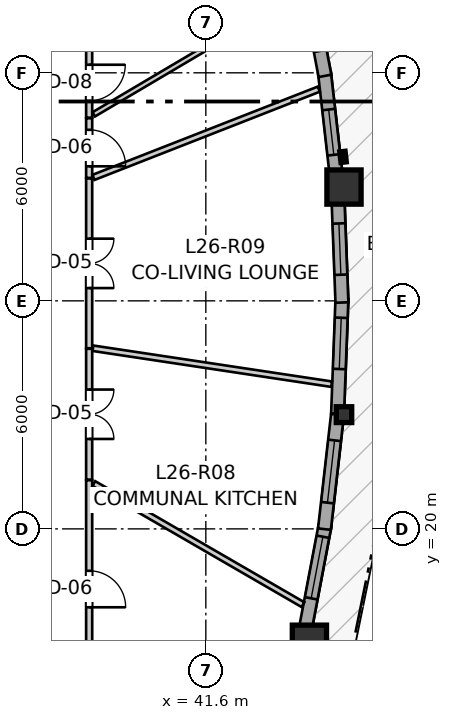
"""IFC4 building model, lengths in metres.
Left out: names, types, materials, properties, quantities, classifications, styles, units other than length and angle.
Written with IfcOpenShell. Run it as: python <this file> out.ifc"""

import sys

from ifc_helpers import new_model, si_unit, direction, frame, frame_2d, origin, origin_2d, place, context, subcontext, project, spatial, rectangle, i_section, extrude, source, transform, mapped, element, fill, save


model = new_model("IFC4")
c1 = context("Model", 3, precision=1e-05, world=origin(), true_north=direction((0.0, 1.0)))
c2 = subcontext(c1, "Body", "Model", "MODEL_VIEW")
j1 = project(units=[si_unit("LENGTHUNIT", "METRE"), si_unit("PLANEANGLEUNIT", "RADIAN")], contexts=[c1])
p1 = place(None, origin())
s1 = spatial("IfcSite", under=j1, at=p1, CompositionType="ELEMENT")
p2 = place(p1, origin())
s2 = spatial("IfcBuilding", under=s1, at=p2, CompositionType="ELEMENT")
p3 = place(p2, frame((0.0, 0.0, 89.6)))
s3 = spatial("IfcBuildingStorey", under=s2, at=p3, CompositionType="ELEMENT", Elevation=89.6)
m1 = source(origin(), c2, "Body", "SweptSolid", [
    extrude(rectangle(XDim=0.9, YDim=0.9, at=origin_2d()), origin(), (0.0, 0.0, 1.0), 2.95),
])
p4 = place(p3, frame((44.325, 17.017, 0.0), z_axis=(0.0, 0.0, 1.0), x_axis=(1.0, 0.0, 0.0)))
e1 = element("IfcColumn", 1, at=p4, inside=s3, PredefinedType="COLUMN", context=c2, shape_type="MappedRepresentation", body=[
    mapped(m1, transform((0.0, 0.0, 0.0), x_axis=(1.0, 0.0, 0.0), y_axis=(0.0, 1.0, 0.0), z_axis=(0.0, 0.0, 1.0), scale=1.0)),
])
m2 = source(origin(), c2, "Body", "SweptSolid", [
    extrude(i_section(OverallWidth=0.406, OverallDepth=0.416, WebThickness=0.027, FlangeThickness=0.044, FilletRadius=0.015, at=origin_2d()), origin(), (0.0, 0.0, 1.0), 2.95),
])
p5 = place(p3, frame((45.236, 23.006, 0.0), z_axis=(0.0, 0.0, 1.0), x_axis=(1.0, 0.0, 0.0)))
e2 = element("IfcColumn", 2, at=p5, inside=s3, PredefinedType="PILASTER", context=c2, shape_type="MappedRepresentation", body=[
    mapped(m2, transform((0.0, 0.0, 0.0), x_axis=(1.0, 0.0, 0.0), y_axis=(0.0, 1.0, 0.0), z_axis=(0.0, 0.0, 1.0), scale=1.0)),
])
p6 = place(p3, frame((45.236, 28.994, 0.0), z_axis=(0.0, 0.0, 1.0), x_axis=(1.0, 0.0, 0.0)))
e3 = element("IfcColumn", 3, at=p6, inside=s3, PredefinedType="COLUMN", context=c2, shape_type="MappedRepresentation", body=[
    mapped(m1, transform((0.0, 0.0, 0.0), x_axis=(1.0, 0.0, 0.0), y_axis=(0.0, 1.0, 0.0), z_axis=(0.0, 0.0, 1.0), scale=1.0)),
])
p7 = place(p3, frame((44.201, 17.275, 0.0), z_axis=(0.0, 0.0, 1.0), x_axis=(0.186703550023, 0.982416298933, 0.0)))
e4 = element("IfcWall", 4, at=p7, inside=s3, PredefinedType="SOLIDWALL", context=c2, shape_type="SweptSolid", body=[
    extrude(rectangle(XDim=2.856, YDim=0.34, at=frame_2d((1.428, 0.0))), origin(), (0.0, 0.0, 1.0), 2.48),
])
p8 = place(p7, frame((0.914, 0.0, 0.82)))
e5 = element("IfcOpeningElement", 5, at=p8, cuts=e4, PredefinedType="OPENING", context=c2, shape_type="SweptSolid", body=[
    extrude(rectangle(XDim=1.65, YDim=1.45, at=frame_2d((0.825, 0.725))), frame((0.0, 0.18, 0.0), z_axis=(0.0, -1.0, 0.0), x_axis=(1.0, 0.0, 0.0)), (0.0, 0.0, 1.0), 0.36),
])
p9 = place(p3, frame((44.721, 19.993, 0.0), z_axis=(0.0, 0.0, 1.0), x_axis=(0.113224078967, 0.993569478165, 0.0)))
e6 = element("IfcWall", 6, at=p9, inside=s3, PredefinedType="SOLIDWALL", context=c2, shape_type="SweptSolid", body=[
    extrude(rectangle(XDim=3.032, YDim=0.34, at=frame_2d((1.516, 0.0))), origin(), (0.0, 0.0, 1.0), 2.48),
])
p10 = place(p9, frame((0.701, 0.0, 0.82)))
e7 = element("IfcOpeningElement", 7, at=p10, cuts=e6, PredefinedType="OPENING", context=c2, shape_type="SweptSolid", body=[
    extrude(rectangle(XDim=1.65, YDim=1.45, at=frame_2d((0.825, 0.725))), frame((0.0, 0.18, 0.0), z_axis=(0.0, -1.0, 0.0), x_axis=(1.0, 0.0, 0.0)), (0.0, 0.0, 1.0), 0.36),
])
p11 = place(p3, frame((45.067, 23.032, 0.0), z_axis=(0.0, 0.0, 1.0), x_axis=(0.037985210196, 0.999278301479, 0.0)))
e8 = element("IfcWall", 8, at=p11, inside=s3, PredefinedType="SOLIDWALL", context=c2, shape_type="SweptSolid", body=[
    extrude(rectangle(XDim=3.014, YDim=0.34, at=frame_2d((1.507, 0.0))), origin(), (0.0, 0.0, 1.0), 2.48),
])
p12 = place(p11, frame((1.175, 0.0, 0.82)))
e9 = element("IfcOpeningElement", 9, at=p12, cuts=e8, PredefinedType="OPENING", context=c2, shape_type="SweptSolid", body=[
    extrude(rectangle(XDim=1.35, YDim=1.45, at=frame_2d((0.675, 0.725))), frame((0.0, 0.18, 0.0), z_axis=(0.0, -1.0, 0.0), x_axis=(1.0, 0.0, 0.0)), (0.0, 0.0, 1.0), 0.36),
])
p13 = place(p3, frame((45.181, 25.956, 0.0), z_axis=(0.0, 0.0, 1.0), x_axis=(-0.037958336355, 0.999279322663, 0.0)))
e10 = element("IfcWall", 10, at=p13, inside=s3, PredefinedType="SOLIDWALL", context=c2, shape_type="SweptSolid", body=[
    extrude(rectangle(XDim=2.804, YDim=0.34, at=frame_2d((1.402, 0.0))), origin(), (0.0, 0.0, 1.0), 2.48),
])
p14 = place(p13, frame((0.732, 0.0, 0.82)))
e11 = element("IfcOpeningElement", 11, at=p14, cuts=e10, PredefinedType="OPENING", context=c2, shape_type="SweptSolid", body=[
    extrude(rectangle(XDim=1.35, YDim=1.45, at=frame_2d((0.675, 0.725))), frame((0.0, 0.18, 0.0), z_axis=(0.0, -1.0, 0.0), x_axis=(1.0, 0.0, 0.0)), (0.0, 0.0, 1.0), 0.36),
])
p15 = place(p3, frame((45.041, 29.204, 0.0), z_axis=(0.0, 0.0, 1.0), x_axis=(-0.113261075266, 0.993565261485, 0.0)))
e12 = element("IfcWall", 12, at=p15, inside=s3, PredefinedType="SOLIDWALL", context=c2, shape_type="SweptSolid", body=[
    extrude(rectangle(XDim=2.822, YDim=0.34, at=frame_2d((1.411, 0.0))), origin(), (0.0, 0.0, 1.0), 2.48),
])
p16 = place(p15, frame((0.642, 0.0, 0.82)))
e13 = element("IfcOpeningElement", 13, at=p16, cuts=e12, PredefinedType="OPENING", context=c2, shape_type="SweptSolid", body=[
    extrude(rectangle(XDim=1.2, YDim=1.45, at=frame_2d((0.6, 0.725))), frame((0.0, 0.18, 0.0), z_axis=(0.0, -1.0, 0.0), x_axis=(1.0, 0.0, 0.0)), (0.0, 0.0, 1.0), 0.36),
])
p17 = place(p3, frame((44.735, 31.919, 0.0), z_axis=(0.0, 0.0, 1.0), x_axis=(-0.186735196273, 0.982410284185, 0.0)))
e14 = element("IfcWall", 14, at=p17, inside=s3, PredefinedType="SOLIDWALL", context=c2, shape_type="SweptSolid", body=[
    extrude(rectangle(XDim=3.066, YDim=0.34, at=frame_2d((1.533, 0.0))), origin(), (0.0, 0.0, 1.0), 2.48),
])
p18 = place(p17, frame((0.669, 0.0, 0.82)))
e15 = element("IfcOpeningElement", 15, at=p18, cuts=e14, PredefinedType="OPENING", context=c2, shape_type="SweptSolid", body=[
    extrude(rectangle(XDim=1.05, YDim=1.45, at=frame_2d((0.525, 0.725))), frame((0.0, 0.18, 0.0), z_axis=(0.0, -1.0, 0.0), x_axis=(1.0, 0.0, 0.0)), (0.0, 0.0, 1.0), 0.36),
])
p19 = place(p3, frame((38.53, 21.281, 0.0), z_axis=(0.0, 0.0, 1.0), x_axis=(0.0, -1.0, 0.0)))
e16 = element("IfcWall", 16, at=p19, inside=s3, PredefinedType="PARTITIONING", context=c2, shape_type="SweptSolid", body=[
    extrude(rectangle(XDim=5.711, YDim=0.16, at=frame_2d((2.855, 0.0))), origin(), (0.0, 0.0, 1.0), 2.95),
])
p20 = place(p19, frame((2.384, 0.0, 0.0)))
e17 = element("IfcOpeningElement", 17, at=p20, cuts=e16, PredefinedType="OPENING", context=c2, shape_type="SweptSolid", body=[
    extrude(rectangle(XDim=0.96, YDim=2.1, at=frame_2d((0.48, 1.05))), frame((0.0, 0.09, 0.0), z_axis=(0.0, -1.0, 0.0), x_axis=(1.0, 0.0, 0.0)), (0.0, 0.0, 1.0), 0.18),
])
p21 = place(p3, frame((38.53, 29.22, 0.0), z_axis=(0.0, 0.0, 1.0), x_axis=(0.0, -1.0, 0.0)))
e18 = element("IfcWall", 18, at=p21, inside=s3, PredefinedType="PARTITIONING", context=c2, shape_type="SweptSolid", body=[
    extrude(rectangle(XDim=4.467, YDim=0.16, at=frame_2d((2.233, 0.0))), origin(), (0.0, 0.0, 1.0), 2.95),
])
p22 = place(p21, frame((1.584, 0.0, 0.0)))
e19 = element("IfcOpeningElement", 19, at=p22, cuts=e18, PredefinedType="OPENING", context=c2, shape_type="SweptSolid", body=[
    extrude(rectangle(XDim=1.3, YDim=2.1, at=frame_2d((0.65, 1.05))), frame((0.0, 0.09, 0.0), z_axis=(0.0, -1.0, 0.0), x_axis=(1.0, 0.0, 0.0)), (0.0, 0.0, 1.0), 0.18),
])
p23 = place(p3, frame((38.53, 24.738, 0.0), z_axis=(0.0, 0.0, 1.0), x_axis=(0.0, -1.0, 0.0)))
e20 = element("IfcWall", 20, at=p23, inside=s3, PredefinedType="PARTITIONING", context=c2, shape_type="SweptSolid", body=[
    extrude(rectangle(XDim=3.442, YDim=0.16, at=frame_2d((1.721, 0.0))), origin(), (0.0, 0.0, 1.0), 2.95),
])
p24 = place(p23, frame((1.072, 0.0, 0.0)))
e21 = element("IfcOpeningElement", 21, at=p24, cuts=e20, PredefinedType="OPENING", context=c2, shape_type="SweptSolid", body=[
    extrude(rectangle(XDim=1.3, YDim=2.1, at=frame_2d((0.65, 1.05))), frame((0.0, 0.09, 0.0), z_axis=(0.0, -1.0, 0.0), x_axis=(1.0, 0.0, 0.0)), (0.0, 0.0, 1.0), 0.18),
])
p25 = place(p3, frame((38.53, 32.605, 0.0), z_axis=(0.0, 0.0, 1.0), x_axis=(0.0, -1.0, 0.0)))
e22 = element("IfcWall", 22, at=p25, inside=s3, PredefinedType="PARTITIONING", context=c2, shape_type="SweptSolid", body=[
    extrude(rectangle(XDim=1.786, YDim=0.16, at=frame_2d((0.893, 0.0))), origin(), (0.0, 0.0, 1.0), 2.95),
])
p26 = place(p25, frame((0.393, 0.0, 0.0)))
e23 = element("IfcOpeningElement", 23, at=p26, cuts=e22, PredefinedType="OPENING", context=c2, shape_type="SweptSolid", body=[
    extrude(rectangle(XDim=0.95, YDim=2.1, at=frame_2d((0.475, 1.05))), frame((0.0, 0.09, 0.0), z_axis=(0.0, -1.0, 0.0), x_axis=(1.0, 0.0, 0.0)), (0.0, 0.0, 1.0), 0.18),
])
p27 = place(p3, frame((38.53, 30.804, 0.0), z_axis=(0.0, 0.0, 1.0), x_axis=(0.0, -1.0, 0.0)))
e24 = element("IfcWall", 24, at=p27, inside=s3, PredefinedType="PARTITIONING", context=c2, shape_type="SweptSolid", body=[
    extrude(rectangle(XDim=1.569, YDim=0.16, at=frame_2d((0.784, 0.0))), origin(), (0.0, 0.0, 1.0), 2.95),
])
p28 = place(p27, frame((0.304, 0.0, 0.0)))
e25 = element("IfcOpeningElement", 25, at=p28, cuts=e24, PredefinedType="OPENING", context=c2, shape_type="SweptSolid", body=[
    extrude(rectangle(XDim=0.96, YDim=2.1, at=frame_2d((0.48, 1.05))), frame((0.0, 0.09, 0.0), z_axis=(0.0, -1.0, 0.0), x_axis=(1.0, 0.0, 0.0)), (0.0, 0.0, 1.0), 0.18),
])
p29 = place(p3, frame((38.644, 29.249, 0.0), z_axis=(0.0, 0.0, 1.0), x_axis=(0.931159602012, 0.364611842349, 0.0)))
e26 = element("IfcWall", 26, at=p29, inside=s3, PredefinedType="PARTITIONING", context=c2, shape_type="SweptSolid", body=[
    extrude(rectangle(XDim=6.368, YDim=0.145, at=frame_2d((3.184, 0.0))), origin(), (0.0, 0.0, 1.0), 2.95),
])
p30 = place(p3, frame((38.65, 30.907, 0.0), z_axis=(0.0, 0.0, 1.0), x_axis=(0.860799697267, 0.508943888052, 0.0)))
e27 = element("IfcWall", 27, at=p30, inside=s3, PredefinedType="PARTITIONING", context=c2, shape_type="SweptSolid", body=[
    extrude(rectangle(XDim=6.363, YDim=0.13, at=frame_2d((3.181, 0.0))), origin(), (0.0, 0.0, 1.0), 2.95),
])
p31 = place(p3, frame((38.653, 21.193, 0.0), z_axis=(0.0, 0.0, 1.0), x_axis=(0.865364941279, -0.501142213753, 0.0)))
e28 = element("IfcWall", 28, at=p31, inside=s3, PredefinedType="PARTITIONING", context=c2, shape_type="SweptSolid", body=[
    extrude(rectangle(XDim=6.359, YDim=0.145, at=frame_2d((3.179, 0.0))), origin(), (0.0, 0.0, 1.0), 2.95),
])
p32 = place(p3, frame((38.629, 24.753, 0.0), z_axis=(0.0, 0.0, 1.0), x_axis=(0.988841427723, -0.148971912852, 0.0)))
e29 = element("IfcWall", 29, at=p32, inside=s3, PredefinedType="PARTITIONING", context=c2, shape_type="SweptSolid", body=[
    extrude(rectangle(XDim=6.352, YDim=0.145, at=frame_2d((3.176, 0.0))), origin(), (0.0, 0.0, 1.0), 2.95),
])
m3 = source(origin(), c2, "Body", "SweptSolid", [
    extrude(rectangle(XDim=1.65, YDim=1.45, at=frame_2d((0.825, 0.725))), frame((0.0, 0.03, 0.0), z_axis=(0.0, -1.0, 0.0), x_axis=(1.0, 0.0, 0.0)), (0.0, 0.0, 1.0), 0.06),
])
p33 = place(p8, origin())
e30 = element("IfcWindow", 30, at=p33, inside=s3, PartitioningType="SINGLE_PANEL", PredefinedType="WINDOW", context=c2, shape_type="MappedRepresentation", body=[
    mapped(m3, transform((0.0, 0.0, 0.0), x_axis=(1.0, 0.0, 0.0), y_axis=(0.0, 1.0, 0.0), z_axis=(0.0, 0.0, 1.0), scale=1.0)),
])
fill(e5, e30)
p34 = place(p10, origin())
e31 = element("IfcWindow", 31, at=p34, inside=s3, PartitioningType="SINGLE_PANEL", PredefinedType="WINDOW", context=c2, shape_type="MappedRepresentation", body=[
    mapped(m3, transform((0.0, 0.0, 0.0), x_axis=(1.0, 0.0, 0.0), y_axis=(0.0, 1.0, 0.0), z_axis=(0.0, 0.0, 1.0), scale=1.0)),
])
fill(e7, e31)
m4 = source(origin(), c2, "Body", "SweptSolid", [
    extrude(rectangle(XDim=1.35, YDim=1.45, at=frame_2d((0.675, 0.725))), frame((0.0, 0.03, 0.0), z_axis=(0.0, -1.0, 0.0), x_axis=(1.0, 0.0, 0.0)), (0.0, 0.0, 1.0), 0.06),
])
p35 = place(p12, origin())
e32 = element("IfcWindow", 32, at=p35, inside=s3, PartitioningType="SINGLE_PANEL", PredefinedType="WINDOW", context=c2, shape_type="MappedRepresentation", body=[
    mapped(m4, transform((0.0, 0.0, 0.0), x_axis=(1.0, 0.0, 0.0), y_axis=(0.0, 1.0, 0.0), z_axis=(0.0, 0.0, 1.0), scale=1.0)),
])
fill(e9, e32)
p36 = place(p14, origin())
e33 = element("IfcWindow", 33, at=p36, inside=s3, PartitioningType="SINGLE_PANEL", PredefinedType="WINDOW", context=c2, shape_type="MappedRepresentation", body=[
    mapped(m4, transform((0.0, 0.0, 0.0), x_axis=(1.0, 0.0, 0.0), y_axis=(0.0, 1.0, 0.0), z_axis=(0.0, 0.0, 1.0), scale=1.0)),
])
fill(e11, e33)
m5 = source(origin(), c2, "Body", "SweptSolid", [
    extrude(rectangle(XDim=1.2, YDim=1.45, at=frame_2d((0.6, 0.725))), frame((0.0, 0.03, 0.0), z_axis=(0.0, -1.0, 0.0), x_axis=(1.0, 0.0, 0.0)), (0.0, 0.0, 1.0), 0.06),
])
p37 = place(p16, origin())
e34 = element("IfcWindow", 34, at=p37, inside=s3, PartitioningType="SINGLE_PANEL", PredefinedType="WINDOW", context=c2, shape_type="MappedRepresentation", body=[
    mapped(m5, transform((0.0, 0.0, 0.0), x_axis=(1.0, 0.0, 0.0), y_axis=(0.0, 1.0, 0.0), z_axis=(0.0, 0.0, 1.0), scale=1.0)),
])
fill(e13, e34)
m6 = source(origin(), c2, "Body", "SweptSolid", [
    extrude(rectangle(XDim=0.96, YDim=2.1, at=frame_2d((0.48, 1.05))), frame((0.0, 0.025, 0.0), z_axis=(0.0, -1.0, 0.0), x_axis=(1.0, 0.0, 0.0)), (0.0, 0.0, 1.0), 0.05),
])
p38 = place(p20, origin())
e35 = element("IfcDoor", 35, at=p38, inside=s3, OperationType="SINGLE_SWING_RIGHT", PredefinedType="DOOR", context=c2, shape_type="MappedRepresentation", body=[
    mapped(m6, transform((0.0, 0.0, 0.0), x_axis=(1.0, 0.0, 0.0), y_axis=(0.0, 1.0, 0.0), z_axis=(0.0, 0.0, 1.0), scale=1.0)),
])
fill(e17, e35)
m7 = source(origin(), c2, "Body", "SweptSolid", [
    extrude(rectangle(XDim=1.3, YDim=2.1, at=frame_2d((0.65, 1.05))), frame((0.0, 0.025, 0.0), z_axis=(0.0, -1.0, 0.0), x_axis=(1.0, 0.0, 0.0)), (0.0, 0.0, 1.0), 0.05),
])
p39 = place(p22, origin())
e36 = element("IfcDoor", 36, at=p39, inside=s3, OperationType="DOUBLE_DOOR_SINGLE_SWING", PredefinedType="DOOR", context=c2, shape_type="MappedRepresentation", body=[
    mapped(m7, transform((0.0, 0.0, 0.0), x_axis=(1.0, 0.0, 0.0), y_axis=(0.0, 1.0, 0.0), z_axis=(0.0, 0.0, 1.0), scale=1.0)),
])
fill(e19, e36)
p40 = place(p24, origin())
e37 = element("IfcDoor", 37, at=p40, inside=s3, OperationType="DOUBLE_DOOR_SINGLE_SWING", PredefinedType="DOOR", context=c2, shape_type="MappedRepresentation", body=[
    mapped(m7, transform((0.0, 0.0, 0.0), x_axis=(1.0, 0.0, 0.0), y_axis=(0.0, 1.0, 0.0), z_axis=(0.0, 0.0, 1.0), scale=1.0)),
])
fill(e21, e37)
m8 = source(origin(), c2, "Body", "SweptSolid", [
    extrude(rectangle(XDim=0.95, YDim=2.1, at=frame_2d((0.475, 1.05))), frame((0.0, 0.025, 0.0), z_axis=(0.0, -1.0, 0.0), x_axis=(1.0, 0.0, 0.0)), (0.0, 0.0, 1.0), 0.05),
])
p41 = place(p26, origin())
e38 = element("IfcDoor", 38, at=p41, inside=s3, OperationType="SINGLE_SWING_LEFT", PredefinedType="DOOR", context=c2, shape_type="MappedRepresentation", body=[
    mapped(m8, transform((0.0, 0.0, 0.0), x_axis=(1.0, 0.0, 0.0), y_axis=(0.0, 1.0, 0.0), z_axis=(0.0, 0.0, 1.0), scale=1.0)),
])
fill(e23, e38)
p42 = place(p28, origin())
e39 = element("IfcDoor", 39, at=p42, inside=s3, OperationType="SINGLE_SWING_RIGHT", PredefinedType="DOOR", context=c2, shape_type="MappedRepresentation", body=[
    mapped(m6, transform((0.0, 0.0, 0.0), x_axis=(1.0, 0.0, 0.0), y_axis=(0.0, 1.0, 0.0), z_axis=(0.0, 0.0, 1.0), scale=1.0)),
])
fill(e25, e39)
save(model, sys.argv[1])
